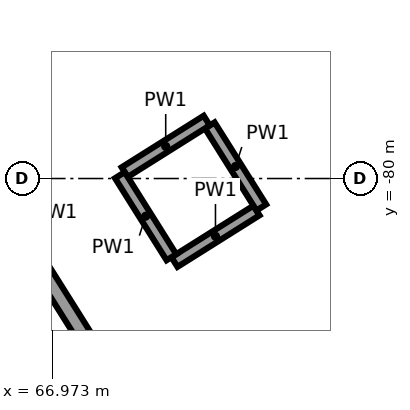
"""IFC4 building model, lengths in metres.
Left out: names, types, materials, properties, quantities, classifications, styles, units other than length and angle.
Written with IfcOpenShell. Run it as: python <this file> out.ifc"""

import sys

from ifc_helpers import new_model, si_unit, direction, frame, frame_2d, origin, place, context, subcontext, project, spatial, rectangle, extrude, element, save


model = new_model("IFC4")
c1 = context("Model", 3, precision=1e-05, world=origin(), true_north=direction((0.0, 1.0)))
c2 = subcontext(c1, "Body", "Model", "MODEL_VIEW")
j1 = project(units=[si_unit("LENGTHUNIT", "METRE"), si_unit("PLANEANGLEUNIT", "RADIAN")], contexts=[c1])
p1 = place(None, origin())
s1 = spatial("IfcSite", under=j1, at=p1, CompositionType="ELEMENT")
p2 = place(p1, origin())
s2 = spatial("IfcBuilding", under=s1, at=p2, CompositionType="ELEMENT")
p3 = place(p2, frame((0.0, 0.0, 6.5)))
s3 = spatial("IfcBuildingStorey", under=s2, at=p3, CompositionType="ELEMENT", Elevation=6.5)
p4 = place(p3, frame((67.437, -82.143, 0.0), z_axis=(0.0, 0.0, 1.0), x_axis=(-0.532038212918, 0.84672034344, 0.0)))
e1 = element("IfcWall", 1, at=p4, inside=s3, PredefinedType="SHEAR", context=c2, shape_type="SweptSolid", body=[
    extrude(rectangle(XDim=3.0, YDim=0.2, at=frame_2d((1.5, 0.0))), origin(), (0.0, 0.0, 1.0), 5.15),
])
for number, where, z_axis, x_axis in (
    (2, (68.582, -81.099, 0.0), (0.0, 0.0, 1.0), (0.847, 0.532, 0.0)),
    (3, (69.725, -80.381, 0.0), (0.0, 0.0, 1.0), (-0.532, 0.847, 0.0)),
):
    element("IfcWall", number, at=place(p3, frame(where, z_axis=z_axis, x_axis=x_axis)), inside=s3, PredefinedType="PARTITIONING", context=c2, shape_type="SweptSolid", body=[
        extrude(rectangle(XDim=1.275, YDim=0.15, at=frame_2d((0.638, 0.0))), origin(), (0.0, 0.0, 1.0), 5.15),
    ])
for number, where, z_axis, x_axis in (
    (4, (69.007, -79.238, 0.0), (0.0, 0.0, 1.0), (-0.847, -0.532, 0.0)),
    (5, (67.864, -79.956, 0.0), (0.0, 0.0, 1.0), (0.532, -0.847, 0.0)),
):
    element("IfcWall", number, at=place(p3, frame(where, z_axis=z_axis, x_axis=x_axis)), inside=s3, PredefinedType="PARTITIONING", context=c2, shape_type="SweptSolid", body=[
        extrude(rectangle(XDim=1.275, YDim=0.15, at=frame_2d((0.637, 0.0))), origin(), (0.0, 0.0, 1.0), 5.15),
    ])
p5 = place(p3, frame((72.143, -78.552, 0.0), z_axis=(0.0, 0.0, 1.0), x_axis=(-0.532063867314, 0.846704222913, 0.0)))
e6 = element("IfcWall", 6, at=p5, inside=s3, PredefinedType="PARTITIONING", context=c2, shape_type="SweptSolid", body=[
    extrude(rectangle(XDim=5.108, YDim=0.15, at=frame_2d((2.554, 0.0))), origin(), (0.0, 0.0, 1.0), 4.05),
])
p6 = place(p5, frame((3.15, 0.0, 0.0)))
e7 = element("IfcOpeningElement", 7, at=p6, cuts=e6, PredefinedType="OPENING", context=c2, shape_type="SweptSolid", body=[
    extrude(rectangle(XDim=1.8, YDim=2.1, at=frame_2d((0.9, 1.05))), frame((0.0, 0.085, 0.0), z_axis=(0.0, -1.0, 0.0), x_axis=(1.0, 0.0, 0.0)), (0.0, 0.0, 1.0), 0.17),
])
p7 = place(p5, frame((0.05, 0.0, 0.0)))
e8 = element("IfcOpeningElement", 8, at=p7, cuts=e6, PredefinedType="OPENING", context=c2, shape_type="SweptSolid", body=[
    extrude(rectangle(XDim=1.8, YDim=2.1, at=frame_2d((0.9, 1.05))), frame((0.0, 0.085, 0.0), z_axis=(0.0, -1.0, 0.0), x_axis=(1.0, 0.0, 0.0)), (0.0, 0.0, 1.0), 0.17),
])
save(model, sys.argv[1])
